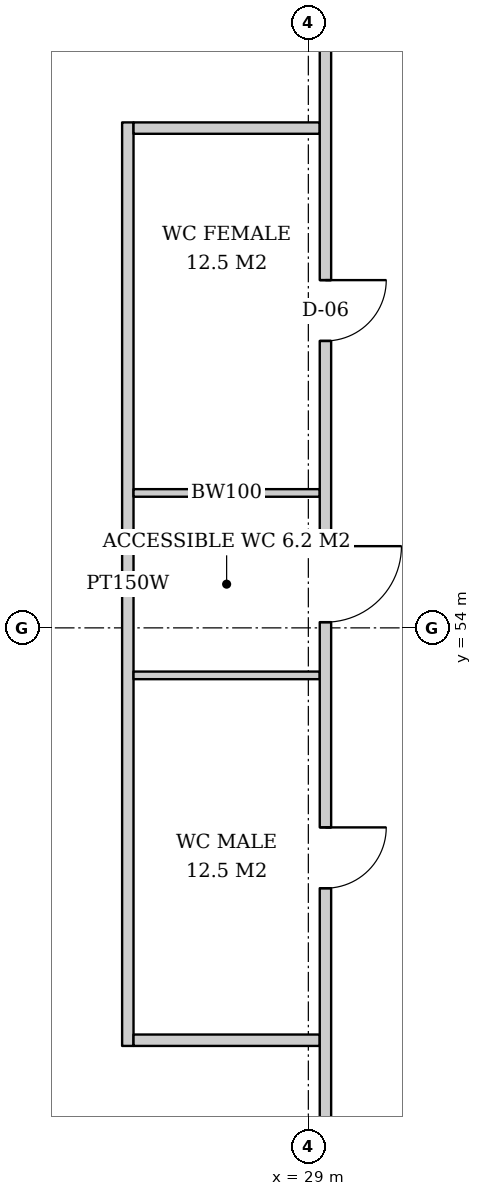
"""IFC4 building model, lengths in metres.
Left out: names, types, materials, properties, quantities, classifications, styles, units other than length and angle.
Written with IfcOpenShell. Run it as: python <this file> out.ifc"""

import sys

from ifc_helpers import new_model, si_unit, direction, frame, frame_2d, origin, place, context, subcontext, project, spatial, rectangle, extrude, element, fill, save


model = new_model("IFC4")
c1 = context("Model", 3, precision=1e-05, world=origin(), true_north=direction((0.0, 1.0)))
c2 = subcontext(c1, "Body", "Model", "MODEL_VIEW")
j1 = project(units=[si_unit("LENGTHUNIT", "METRE"), si_unit("PLANEANGLEUNIT", "RADIAN")], contexts=[c1])
p1 = place(None, origin())
s1 = spatial("IfcSite", under=j1, at=p1, CompositionType="ELEMENT")
p2 = place(p1, origin())
s2 = spatial("IfcBuilding", under=s1, at=p2, CompositionType="ELEMENT")
p3 = place(p2, frame((0.0, 0.0, 24.8)))
s3 = spatial("IfcBuildingStorey", under=s2, at=p3, CompositionType="ELEMENT", Elevation=24.8)
p4 = place(p3, frame((26.625, 60.65, 0.0), z_axis=(0.0, 0.0, 1.0), x_axis=(0.0, -1.0, 0.0)))
e1 = element("IfcWall", 1, at=p4, inside=s3, PredefinedType="PARTITIONING", context=c2, shape_type="SweptSolid", body=[
    extrude(rectangle(XDim=12.15, YDim=0.15, at=frame_2d((6.075, 0.0))), origin(), (0.0, 0.0, 1.0), 2.612),
])
p5 = place(p3, frame((29.15, 60.575, 0.0), z_axis=(0.0, 0.0, 1.0), x_axis=(-1.0, 0.0, 0.0)))
e2 = element("IfcWall", 2, at=p5, inside=s3, PredefinedType="PARTITIONING", context=c2, shape_type="SweptSolid", body=[
    extrude(rectangle(XDim=2.45, YDim=0.15, at=frame_2d((1.225, 0.0))), origin(), (0.0, 0.0, 1.0), 3.62),
])
for number, where, z_axis, x_axis in (
    (3, (29.15, 55.775, 0.0), (0.0, 0.0, 1.0), (-1.0, 0.0, 0.0)),
    (4, (29.15, 53.375, 0.0), (0.0, 0.0, 1.0), (-1.0, 0.0, 0.0)),
):
    element("IfcWall", number, at=place(p3, frame(where, z_axis=z_axis, x_axis=x_axis)), inside=s3, PredefinedType="SOLIDWALL", context=c2, shape_type="SweptSolid", body=[
        extrude(rectangle(XDim=2.45, YDim=0.1, at=frame_2d((1.225, 0.0))), origin(), (0.0, 0.0, 1.0), 3.62),
    ])
p6 = place(p3, frame((29.15, 48.575, 0.0), z_axis=(0.0, 0.0, 1.0), x_axis=(-1.0, 0.0, 0.0)))
e5 = element("IfcWall", 5, at=p6, inside=s3, PredefinedType="PARTITIONING", context=c2, shape_type="SweptSolid", body=[
    extrude(rectangle(XDim=2.45, YDim=0.15, at=frame_2d((1.225, 0.0))), origin(), (0.0, 0.0, 1.0), 3.62),
])
p7 = place(p3, frame((29.225, 61.85, 0.0), z_axis=(0.0, 0.0, 1.0), x_axis=(0.0, -1.0, 0.0)))
e6 = element("IfcWall", 6, at=p7, inside=s3, PredefinedType="PARTITIONING", context=c2, shape_type="SweptSolid", body=[
    extrude(rectangle(XDim=31.55, YDim=0.15, at=frame_2d((15.775, 0.0))), origin(), (0.0, 0.0, 1.0), 2.612),
])
p8 = place(p7, frame((3.275, 0.0, 0.0)))
e7 = element("IfcOpeningElement", 7, at=p8, cuts=e6, PredefinedType="OPENING", context=c2, shape_type="SweptSolid", body=[
    extrude(rectangle(XDim=0.8, YDim=2.1, at=frame_2d((0.4, 1.05))), frame((0.0, 0.085, 0.0), z_axis=(0.0, -1.0, 0.0), x_axis=(1.0, 0.0, 0.0)), (0.0, 0.0, 1.0), 0.17),
])
p9 = place(p7, frame((6.775, 0.0, 0.0)))
e8 = element("IfcOpeningElement", 8, at=p9, cuts=e6, PredefinedType="OPENING", context=c2, shape_type="SweptSolid", body=[
    extrude(rectangle(XDim=1.0, YDim=2.1, at=frame_2d((0.5, 1.05))), frame((0.0, 0.085, 0.0), z_axis=(0.0, -1.0, 0.0), x_axis=(1.0, 0.0, 0.0)), (0.0, 0.0, 1.0), 0.17),
])
p10 = place(p7, frame((10.475, 0.0, 0.0)))
e9 = element("IfcOpeningElement", 9, at=p10, cuts=e6, PredefinedType="OPENING", context=c2, shape_type="SweptSolid", body=[
    extrude(rectangle(XDim=0.8, YDim=2.1, at=frame_2d((0.4, 1.05))), frame((0.0, 0.085, 0.0), z_axis=(0.0, -1.0, 0.0), x_axis=(1.0, 0.0, 0.0)), (0.0, 0.0, 1.0), 0.17),
])
p11 = place(p8, origin())
e10 = element("IfcDoor", 10, at=p11, inside=s3, OperationType="SINGLE_SWING_LEFT", PredefinedType="DOOR", context=c2, shape_type="SweptSolid", body=[
    extrude(rectangle(XDim=0.8, YDim=2.1, at=frame_2d((0.4, 1.05))), frame((0.0, 0.025, 0.0), z_axis=(0.0, -1.0, 0.0), x_axis=(1.0, 0.0, 0.0)), (0.0, 0.0, 1.0), 0.05),
])
fill(e7, e10)
p12 = place(p9, origin())
e11 = element("IfcDoor", 11, at=p12, inside=s3, OperationType="SINGLE_SWING_LEFT", PredefinedType="DOOR", context=c2, shape_type="SweptSolid", body=[
    extrude(rectangle(XDim=1.0, YDim=2.1, at=frame_2d((0.5, 1.05))), frame((0.0, 0.025, 0.0), z_axis=(0.0, -1.0, 0.0), x_axis=(1.0, 0.0, 0.0)), (0.0, 0.0, 1.0), 0.05),
])
fill(e8, e11)
p13 = place(p10, origin())
e12 = element("IfcDoor", 12, at=p13, inside=s3, OperationType="SINGLE_SWING_LEFT", PredefinedType="DOOR", context=c2, shape_type="SweptSolid", body=[
    extrude(rectangle(XDim=0.8, YDim=2.1, at=frame_2d((0.4, 1.05))), frame((0.0, 0.025, 0.0), z_axis=(0.0, -1.0, 0.0), x_axis=(1.0, 0.0, 0.0)), (0.0, 0.0, 1.0), 0.05),
])
fill(e9, e12)
save(model, sys.argv[1])
